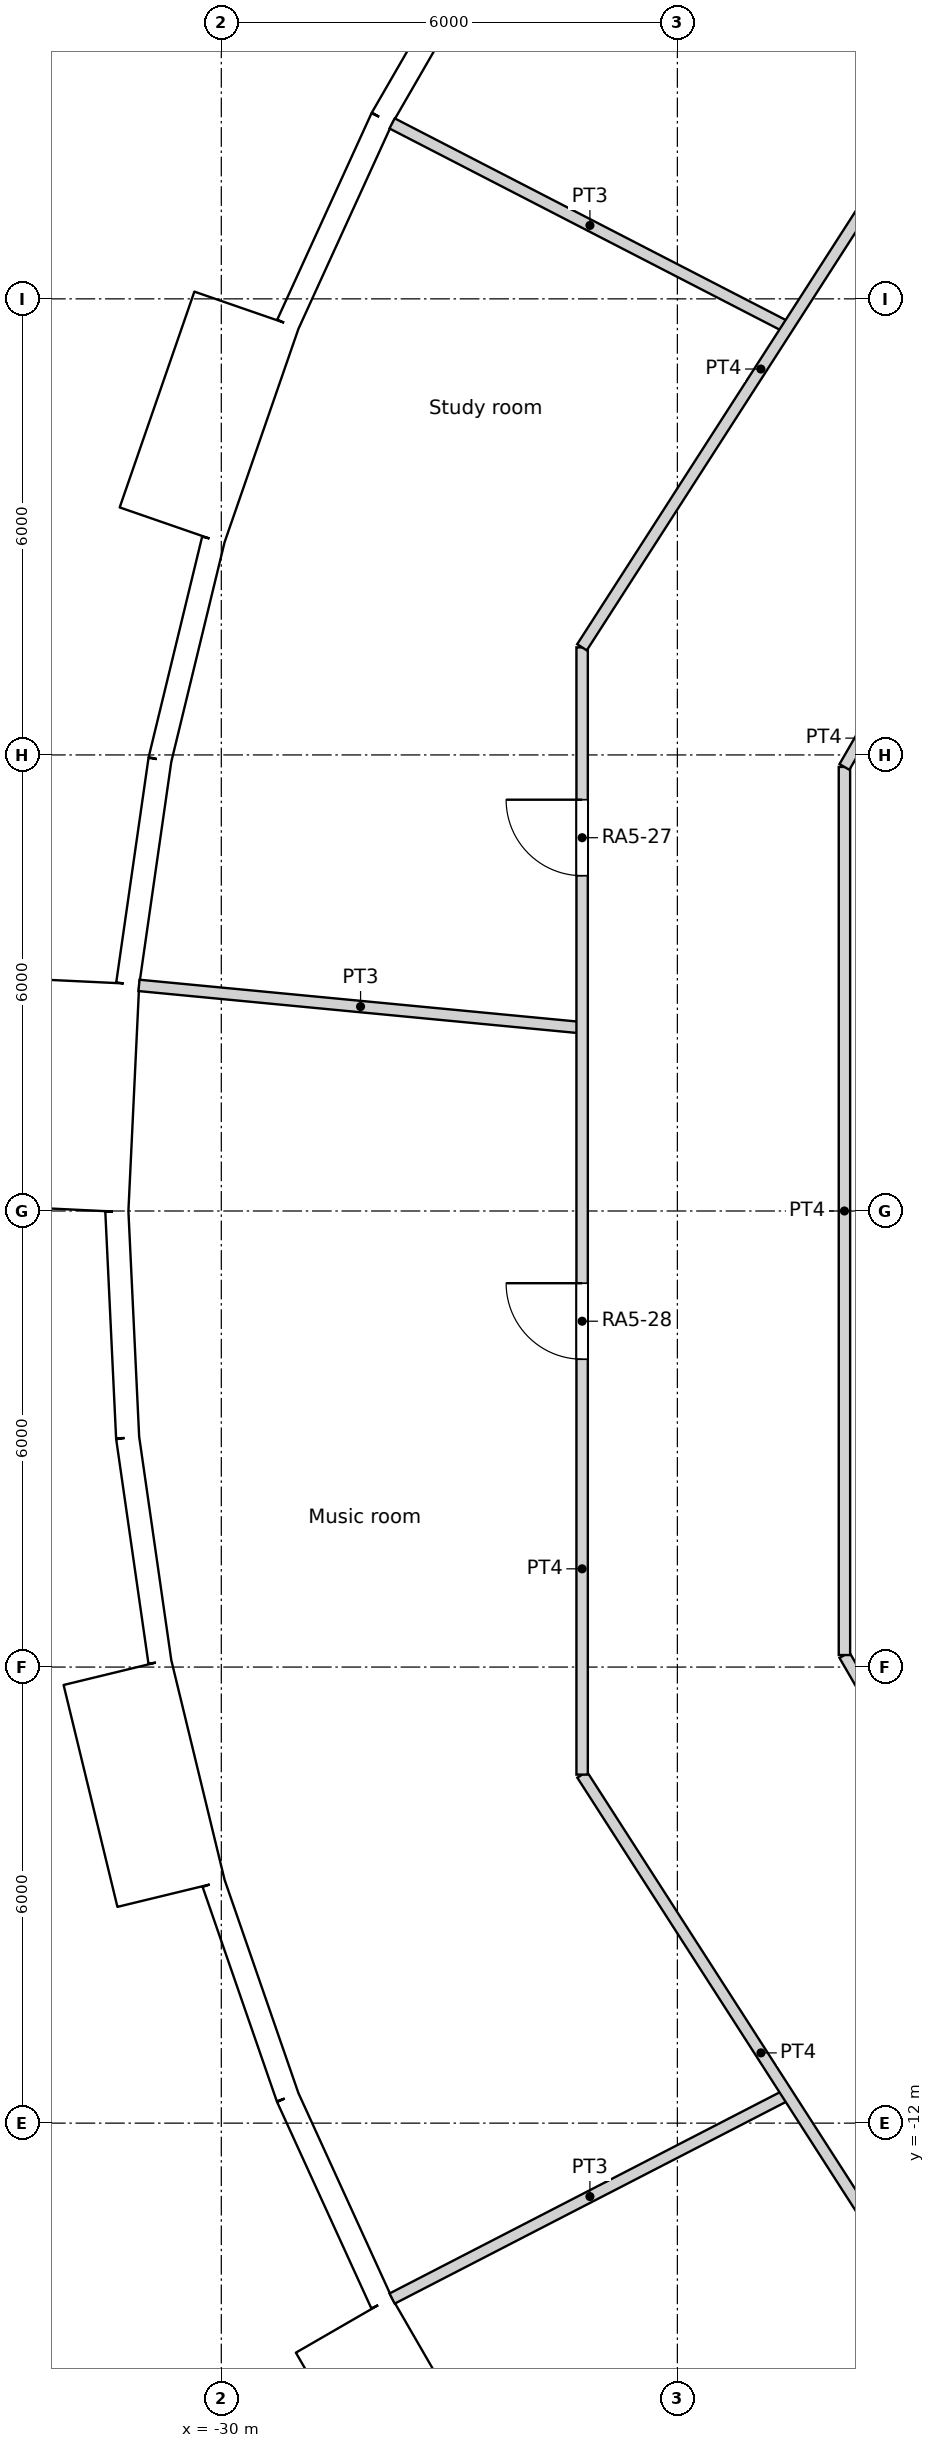
"""IFC4 building model, lengths in metres.
Left out: names, types, materials, properties, quantities, classifications, styles, units other than length and angle.
Written with IfcOpenShell. Run it as: python <this file> out.ifc"""

import sys

from ifc_helpers import new_model, si_unit, direction, frame, frame_2d, origin, origin_2d, place, context, subcontext, project, spatial, rectangle, circle, extrude, element, fill, save


model = new_model("IFC4")
c1 = context("Model", 3, precision=1e-05, world=origin(), true_north=direction((0.0, 1.0)))
c2 = subcontext(c1, "Body", "Model", "MODEL_VIEW")
j1 = project(units=[si_unit("LENGTHUNIT", "METRE"), si_unit("PLANEANGLEUNIT", "RADIAN")], contexts=[c1])
p1 = place(None, origin())
s1 = spatial("IfcSite", under=j1, at=p1, CompositionType="ELEMENT")
p2 = place(p1, origin())
s2 = spatial("IfcBuilding", under=s1, at=p2, CompositionType="ELEMENT")
p3 = place(p2, frame((0.0, 0.0, 71.4)))
s3 = spatial("IfcBuildingStorey", under=s2, at=p3, CompositionType="ELEMENT", Elevation=71.4)
for number, where, z_axis, x_axis in (
    (1, (-26.909, 13.873, 0.0), (0.0, 0.0, 1.0), (1.0, 0.0, 0.0)),
    (2, (-29.048, 8.529, 0.0), (0.0, 0.0, 1.0), (1.0, 0.0, 0.0)),
    (3, (-30.137, 2.878, 0.0), (0.0, 0.0, 1.0), (1.0, 0.0, 0.0)),
    (4, (-30.137, -2.878, 0.0), (0.0, 0.0, 1.0), (1.0, 0.0, 0.0)),
    (5, (-29.048, -8.529, 0.0), (0.0, 0.0, 1.0), (1.0, 0.0, 0.0)),
    (6, (-26.909, -13.873, 0.0), (0.0, 0.0, 1.0), (1.0, 0.0, 0.0)),
):
    element("IfcColumn", number, at=place(p3, frame(where, z_axis=z_axis, x_axis=x_axis)), inside=s3, PredefinedType="COLUMN", context=c2, shape_type="SweptSolid", body=[
        extrude(circle(Radius=0.6, at=origin_2d()), origin(), (0.0, 0.0, 1.0), 3.6),
    ])
for number, where, z_axis, x_axis in (
    (7, (-23.067, 8.396, 0.0), (0.0, 0.0, 1.0), (1.0, 0.0, 0.0)),
    (8, (-24.382, 2.85, 0.0), (0.0, 0.0, 1.0), (1.0, 0.0, 0.0)),
    (9, (-24.382, -2.85, 0.0), (0.0, 0.0, 1.0), (1.0, 0.0, 0.0)),
    (10, (-23.067, -8.396, 0.0), (0.0, 0.0, 1.0), (1.0, 0.0, 0.0)),
):
    element("IfcColumn", number, at=place(p3, frame(where, z_axis=z_axis, x_axis=x_axis)), inside=s3, PredefinedType="COLUMN", context=c2, shape_type="SweptSolid", body=[
        extrude(circle(Radius=0.65, at=origin_2d()), origin(), (0.0, 0.0, 1.0), 3.6),
    ])
p4 = place(p3, frame((-26.397, 16.957, 0.0), z_axis=(0.0, 0.0, 1.0), x_axis=(-0.499999078476, -0.866025935826, 0.0)))
e11 = element("IfcWall", 11, at=p4, inside=s3, PredefinedType="SOLIDWALL", context=c2, shape_type="SweptSolid", body=[
    extrude(rectangle(XDim=2.979, YDim=0.3, at=frame_2d((1.49, 0.0))), origin(), (0.0, 0.0, 1.0), 3.15),
])
p5 = place(p4, frame((1.49, 0.0, 1.55)))
e12 = element("IfcOpeningElement", 12, at=p5, cuts=e11, PredefinedType="OPENING", context=c2, shape_type="SweptSolid", body=[
    extrude(circle(Radius=0.9, at=origin_2d()), frame((0.0, 0.16, 0.0), z_axis=(0.0, -1.0, 0.0), x_axis=(1.0, 0.0, 0.0)), (0.0, 0.0, 1.0), 0.32),
])
p6 = place(p3, frame((-27.887, 14.377, 0.0), z_axis=(0.0, 0.0, 1.0), x_axis=(-0.415407317162, -0.909635509888, 0.0)))
e13 = element("IfcWall", 13, at=p6, inside=s3, PredefinedType="SOLIDWALL", context=c2, shape_type="SweptSolid", body=[
    extrude(rectangle(XDim=2.98, YDim=0.3, at=frame_2d((1.49, 0.0))), origin(), (0.0, 0.0, 1.0), 3.15),
])
p7 = place(p6, frame((1.49, 0.0, 1.55)))
e14 = element("IfcOpeningElement", 14, at=p7, cuts=e13, PredefinedType="OPENING", context=c2, shape_type="SweptSolid", body=[
    extrude(circle(Radius=0.9, at=origin_2d()), frame((0.0, 0.16, 0.0), z_axis=(0.0, -1.0, 0.0), x_axis=(1.0, 0.0, 0.0)), (0.0, 0.0, 1.0), 0.32),
])
p8 = place(p3, frame((-29.668, 11.855, -0.45), z_axis=(0.0, 0.0, 1.0), x_axis=(-0.327071431777, -0.944999618262, 0.0)))
e15 = element("IfcWall", 15, at=p8, inside=s3, PredefinedType="ELEMENTEDWALL", context=c2, shape_type="SweptSolid", body=[
    extrude(rectangle(XDim=3.0, YDim=1.45, at=frame_2d((1.5, 0.0))), origin(), (0.0, 0.0, 1.0), 3.6),
])
p9 = place(p8, frame((1.5, 0.0, 2.0)))
e16 = element("IfcOpeningElement", 16, at=p9, cuts=e15, PredefinedType="OPENING", context=c2, shape_type="SweptSolid", body=[
    extrude(circle(Radius=0.9, at=origin_2d()), frame((0.0, 0.735, 0.0), z_axis=(0.0, -1.0, 0.0), x_axis=(1.0, 0.0, 0.0)), (0.0, 0.0, 1.0), 1.47),
])
p10 = place(p3, frame((-30.105, 8.833, 0.0), z_axis=(0.0, 0.0, 1.0), x_axis=(-0.235743081534, -0.971815414319, 0.0)))
e17 = element("IfcWall", 17, at=p10, inside=s3, PredefinedType="SOLIDWALL", context=c2, shape_type="SweptSolid", body=[
    extrude(rectangle(XDim=2.979, YDim=0.3, at=frame_2d((1.49, 0.0))), origin(), (0.0, 0.0, 1.0), 3.15),
])
p11 = place(p10, frame((1.49, 0.0, 1.55)))
e18 = element("IfcOpeningElement", 18, at=p11, cuts=e17, PredefinedType="OPENING", context=c2, shape_type="SweptSolid", body=[
    extrude(circle(Radius=0.9, at=origin_2d()), frame((0.0, 0.16, 0.0), z_axis=(0.0, -1.0, 0.0), x_axis=(1.0, 0.0, 0.0)), (0.0, 0.0, 1.0), 0.32),
])
p12 = place(p3, frame((-30.807, 5.938, 0.0), z_axis=(0.0, 0.0, 1.0), x_axis=(-0.142315996627, -0.989821275334, 0.0)))
e19 = element("IfcWall", 19, at=p12, inside=s3, PredefinedType="SOLIDWALL", context=c2, shape_type="SweptSolid", body=[
    extrude(rectangle(XDim=2.98, YDim=0.3, at=frame_2d((1.49, 0.0))), origin(), (0.0, 0.0, 1.0), 3.15),
])
p13 = place(p12, frame((1.49, 0.0, 1.55)))
e20 = element("IfcOpeningElement", 20, at=p13, cuts=e19, PredefinedType="OPENING", context=c2, shape_type="SweptSolid", body=[
    extrude(circle(Radius=0.9, at=origin_2d()), frame((0.0, 0.16, 0.0), z_axis=(0.0, -1.0, 0.0), x_axis=(1.0, 0.0, 0.0)), (0.0, 0.0, 1.0), 0.32),
])
p14 = place(p3, frame((-31.806, 3.017, -0.45), z_axis=(0.0, 0.0, 1.0), x_axis=(-0.047607680889, -0.998866111509, 0.0)))
e21 = element("IfcWall", 21, at=p14, inside=s3, PredefinedType="ELEMENTEDWALL", context=c2, shape_type="SweptSolid", body=[
    extrude(rectangle(XDim=3.0, YDim=1.45, at=frame_2d((1.5, 0.0))), origin(), (0.0, 0.0, 1.0), 3.6),
])
p15 = place(p14, frame((1.5, 0.0, 2.0)))
e22 = element("IfcOpeningElement", 22, at=p15, cuts=e21, PredefinedType="OPENING", context=c2, shape_type="SweptSolid", body=[
    extrude(circle(Radius=0.9, at=origin_2d()), frame((0.0, 0.735, 0.0), z_axis=(0.0, -1.0, 0.0), x_axis=(1.0, 0.0, 0.0)), (0.0, 0.0, 1.0), 1.47),
])
p16 = place(p3, frame((-31.374, -0.006, 0.0), z_axis=(0.0, 0.0, 1.0), x_axis=(0.047522328113, -0.998870175914, 0.0)))
e23 = element("IfcWall", 23, at=p16, inside=s3, PredefinedType="SOLIDWALL", context=c2, shape_type="SweptSolid", body=[
    extrude(rectangle(XDim=2.98, YDim=0.3, at=frame_2d((1.49, 0.0))), origin(), (0.0, 0.0, 1.0), 3.15),
])
p17 = place(p16, frame((1.49, 0.0, 1.55)))
e24 = element("IfcOpeningElement", 24, at=p17, cuts=e23, PredefinedType="OPENING", context=c2, shape_type="SweptSolid", body=[
    extrude(circle(Radius=0.9, at=origin_2d()), frame((0.0, 0.16, 0.0), z_axis=(0.0, -1.0, 0.0), x_axis=(1.0, 0.0, 0.0)), (0.0, 0.0, 1.0), 0.32),
])
p18 = place(p3, frame((-31.232, -2.982, 0.0), z_axis=(0.0, 0.0, 1.0), x_axis=(0.142327539111, -0.989819615693, 0.0)))
e25 = element("IfcWall", 25, at=p18, inside=s3, PredefinedType="SOLIDWALL", context=c2, shape_type="SweptSolid", body=[
    extrude(rectangle(XDim=2.979, YDim=0.3, at=frame_2d((1.49, 0.0))), origin(), (0.0, 0.0, 1.0), 3.15),
])
p19 = place(p18, frame((1.49, 0.0, 1.55)))
e26 = element("IfcOpeningElement", 26, at=p19, cuts=e25, PredefinedType="OPENING", context=c2, shape_type="SweptSolid", body=[
    extrude(circle(Radius=0.9, at=origin_2d()), frame((0.0, 0.16, 0.0), z_axis=(0.0, -1.0, 0.0), x_axis=(1.0, 0.0, 0.0)), (0.0, 0.0, 1.0), 0.32),
])
p20 = place(p3, frame((-31.368, -6.066, -0.45), z_axis=(0.0, 0.0, 1.0), x_axis=(0.235751415068, -0.971813392732, 0.0)))
e27 = element("IfcWall", 27, at=p20, inside=s3, PredefinedType="ELEMENTEDWALL", context=c2, shape_type="SweptSolid", body=[
    extrude(rectangle(XDim=3.0, YDim=1.45, at=frame_2d((1.5, 0.0))), origin(), (0.0, 0.0, 1.0), 3.6),
])
p21 = place(p20, frame((1.5, 0.0, 2.0)))
e28 = element("IfcOpeningElement", 28, at=p21, cuts=e27, PredefinedType="OPENING", context=c2, shape_type="SweptSolid", body=[
    extrude(circle(Radius=0.9, at=origin_2d()), frame((0.0, 0.735, 0.0), z_axis=(0.0, -1.0, 0.0), x_axis=(1.0, 0.0, 0.0)), (0.0, 0.0, 1.0), 1.47),
])
p22 = place(p3, frame((-30.102, -8.845, 0.0), z_axis=(0.0, 0.0, 1.0), x_axis=(0.327096492592, -0.944990944154, 0.0)))
e29 = element("IfcWall", 29, at=p22, inside=s3, PredefinedType="SOLIDWALL", context=c2, shape_type="SweptSolid", body=[
    extrude(rectangle(XDim=2.979, YDim=0.3, at=frame_2d((1.49, 0.0))), origin(), (0.0, 0.0, 1.0), 3.15),
])
p23 = place(p22, frame((1.49, 0.0, 1.55)))
e30 = element("IfcOpeningElement", 30, at=p23, cuts=e29, PredefinedType="OPENING", context=c2, shape_type="SweptSolid", body=[
    extrude(circle(Radius=0.9, at=origin_2d()), frame((0.0, 0.16, 0.0), z_axis=(0.0, -1.0, 0.0), x_axis=(1.0, 0.0, 0.0)), (0.0, 0.0, 1.0), 0.32),
])
p24 = place(p3, frame((-29.127, -11.661, 0.0), z_axis=(0.0, 0.0, 1.0), x_axis=(0.415407317162, -0.909635509888, 0.0)))
e31 = element("IfcWall", 31, at=p24, inside=s3, PredefinedType="SOLIDWALL", context=c2, shape_type="SweptSolid", body=[
    extrude(rectangle(XDim=2.98, YDim=0.3, at=frame_2d((1.49, 0.0))), origin(), (0.0, 0.0, 1.0), 3.15),
])
p25 = place(p24, frame((1.49, 0.0, 1.55)))
e32 = element("IfcOpeningElement", 32, at=p25, cuts=e31, PredefinedType="OPENING", context=c2, shape_type="SweptSolid", body=[
    extrude(circle(Radius=0.9, at=origin_2d()), frame((0.0, 0.16, 0.0), z_axis=(0.0, -1.0, 0.0), x_axis=(1.0, 0.0, 0.0)), (0.0, 0.0, 1.0), 0.32),
])
p26 = place(p3, frame((-28.388, -14.658, -0.45), z_axis=(0.0, 0.0, 1.0), x_axis=(0.499990139034, -0.866031096941, 0.0)))
e33 = element("IfcWall", 33, at=p26, inside=s3, PredefinedType="ELEMENTEDWALL", context=c2, shape_type="SweptSolid", body=[
    extrude(rectangle(XDim=3.0, YDim=1.45, at=frame_2d((1.5, 0.0))), origin(), (0.0, 0.0, 1.0), 3.6),
])
p27 = place(p26, frame((1.5, 0.0, 2.0)))
e34 = element("IfcOpeningElement", 34, at=p27, cuts=e33, PredefinedType="OPENING", context=c2, shape_type="SweptSolid", body=[
    extrude(circle(Radius=0.9, at=origin_2d()), frame((0.0, 0.735, 0.0), z_axis=(0.0, -1.0, 0.0), x_axis=(1.0, 0.0, 0.0)), (0.0, 0.0, 1.0), 1.47),
])
p28 = place(p3, frame((-25.255, 7.416, 0.0), z_axis=(0.0, 0.0, 1.0), x_axis=(0.540805851332, 0.841147449123, 0.0)))
e35 = element("IfcWall", 35, at=p28, inside=s3, PredefinedType="PARTITIONING", context=c2, shape_type="SweptSolid", body=[
    extrude(rectangle(XDim=14.829, YDim=0.15, at=frame_2d((7.415, 0.0))), origin(), (0.0, 0.0, 1.0), 3.15),
])
p29 = place(p28, frame((8.754, 0.0, 0.0)))
e36 = element("IfcOpeningElement", 36, at=p29, cuts=e35, PredefinedType="OPENING", context=c2, shape_type="SweptSolid", body=[
    extrude(rectangle(XDim=1.0, YDim=2.04, at=frame_2d((0.5, 1.02))), frame((0.0, 0.075, 0.0), z_axis=(0.0, -1.0, 0.0), x_axis=(1.0, 0.0, 0.0)), (0.0, 0.0, 1.0), 0.15),
])
p30 = place(p3, frame((-21.802, 5.842, 0.0), z_axis=(0.0, 0.0, 1.0), x_axis=(0.500277597875, 0.865865073245, 0.0)))
e37 = element("IfcWall", 37, at=p30, inside=s3, PredefinedType="PARTITIONING", context=c2, shape_type="SweptSolid", body=[
    extrude(rectangle(XDim=0.875, YDim=0.15, at=frame_2d((0.438, 0.0))), origin(), (0.0, 0.0, 1.0), 3.15),
])
p31 = place(p3, frame((-21.802, -5.842, 0.0), z_axis=(0.0, 0.0, 1.0), x_axis=(0.0, 1.0, 0.0)))
e38 = element("IfcWall", 38, at=p31, inside=s3, PredefinedType="PARTITIONING", context=c2, shape_type="SweptSolid", body=[
    extrude(rectangle(XDim=11.684, YDim=0.15, at=frame_2d((5.842, 0.0))), origin(), (0.0, 0.0, 1.0), 3.15),
])
p32 = place(p3, frame((-21.802, -5.842, 0.0), z_axis=(0.0, 0.0, 1.0), x_axis=(0.500277597875, -0.865865073245, 0.0)))
e39 = element("IfcWall", 39, at=p32, inside=s3, PredefinedType="PARTITIONING", context=c2, shape_type="SweptSolid", body=[
    extrude(rectangle(XDim=0.875, YDim=0.15, at=frame_2d((0.438, 0.0))), origin(), (0.0, 0.0, 1.0), 3.15),
])
p33 = place(p3, frame((-25.253, -7.415, 0.0), z_axis=(0.0, 0.0, 1.0), x_axis=(0.0, 1.0, 0.0)))
e40 = element("IfcWall", 40, at=p33, inside=s3, PredefinedType="PARTITIONING", context=c2, shape_type="SweptSolid", body=[
    extrude(rectangle(XDim=14.83, YDim=0.15, at=frame_2d((7.415, 0.0))), origin(), (0.0, 0.0, 1.0), 3.15),
])
p34 = place(p33, frame((11.826, 0.0, 0.0)))
e41 = element("IfcOpeningElement", 41, at=p34, cuts=e40, PredefinedType="OPENING", context=c2, shape_type="SweptSolid", body=[
    extrude(rectangle(XDim=1.0, YDim=2.04, at=frame_2d((0.5, 1.02))), frame((0.0, 0.075, 0.0), z_axis=(0.0, -1.0, 0.0), x_axis=(1.0, 0.0, 0.0)), (0.0, 0.0, 1.0), 0.15),
])
p35 = place(p33, frame((5.465, 0.0, 0.0)))
e42 = element("IfcOpeningElement", 42, at=p35, cuts=e40, PredefinedType="OPENING", context=c2, shape_type="SweptSolid", body=[
    extrude(rectangle(XDim=1.0, YDim=2.04, at=frame_2d((0.5, 1.02))), frame((0.0, 0.075, 0.0), z_axis=(0.0, -1.0, 0.0), x_axis=(1.0, 0.0, 0.0)), (0.0, 0.0, 1.0), 0.15),
])
p36 = place(p3, frame((-25.253, -7.415, 0.0), z_axis=(0.0, 0.0, 1.0), x_axis=(0.540656073354, -0.841243728265, 0.0)))
e43 = element("IfcWall", 43, at=p36, inside=s3, PredefinedType="PARTITIONING", context=c2, shape_type="SweptSolid", body=[
    extrude(rectangle(XDim=14.829, YDim=0.15, at=frame_2d((7.415, 0.0))), origin(), (0.0, 0.0, 1.0), 3.15),
])
p37 = place(p36, frame((8.753, 0.0, 0.0)))
e44 = element("IfcOpeningElement", 44, at=p37, cuts=e43, PredefinedType="OPENING", context=c2, shape_type="SweptSolid", body=[
    extrude(rectangle(XDim=1.0, YDim=2.04, at=frame_2d((0.5, 1.02))), frame((0.0, 0.075, 0.0), z_axis=(0.0, -1.0, 0.0), x_axis=(1.0, 0.0, 0.0)), (0.0, 0.0, 1.0), 0.15),
])
p38 = place(p3, frame((-27.753, 14.308, 0.0), z_axis=(0.0, 0.0, 1.0), x_axis=(0.88877955153, -0.45833493079, 0.0)))
e45 = element("IfcWall", 45, at=p38, inside=s3, PredefinedType="PARTITIONING", context=c2, shape_type="SweptSolid", body=[
    extrude(rectangle(XDim=5.856, YDim=0.15, at=frame_2d((2.928, 0.0))), origin(), (0.0, 0.0, 1.0), 3.15),
])
p39 = place(p3, frame((-31.083, 2.968, 0.0), z_axis=(0.0, 0.0, 1.0), x_axis=(0.995465070325, -0.095127775983, 0.0)))
e46 = element("IfcWall", 46, at=p39, inside=s3, PredefinedType="PARTITIONING", context=c2, shape_type="SweptSolid", body=[
    extrude(rectangle(XDim=5.857, YDim=0.15, at=frame_2d((2.928, 0.0))), origin(), (0.0, 0.0, 1.0), 3.15),
])
p40 = place(p3, frame((-27.753, -14.308, 0.0), z_axis=(0.0, 0.0, 1.0), x_axis=(0.88877955153, 0.45833493079, 0.0)))
e47 = element("IfcWall", 47, at=p40, inside=s3, PredefinedType="PARTITIONING", context=c2, shape_type="SweptSolid", body=[
    extrude(rectangle(XDim=5.856, YDim=0.15, at=frame_2d((2.928, 0.0))), origin(), (0.0, 0.0, 1.0), 3.15),
])
p41 = place(p5, origin())
e48 = element("IfcWindow", 48, at=p41, inside=s3, PartitioningType="SINGLE_PANEL", PredefinedType="WINDOW", context=c2, shape_type="SweptSolid", body=[
    extrude(circle(Radius=0.9, at=origin_2d()), frame((0.0, 0.12, 0.0), z_axis=(0.0, -1.0, 0.0), x_axis=(1.0, 0.0, 0.0)), (0.0, 0.0, 1.0), 0.1),
])
fill(e12, e48)
p42 = place(p7, origin())
e49 = element("IfcWindow", 49, at=p42, inside=s3, PartitioningType="SINGLE_PANEL", PredefinedType="WINDOW", context=c2, shape_type="SweptSolid", body=[
    extrude(circle(Radius=0.9, at=origin_2d()), frame((0.0, 0.12, 0.0), z_axis=(0.0, -1.0, 0.0), x_axis=(1.0, 0.0, 0.0)), (0.0, 0.0, 1.0), 0.1),
])
fill(e14, e49)
p43 = place(p9, origin())
e50 = element("IfcWindow", 50, at=p43, inside=s3, PartitioningType="SINGLE_PANEL", PredefinedType="WINDOW", context=c2, shape_type="SweptSolid", body=[
    extrude(circle(Radius=0.9, at=origin_2d()), frame((0.0, 0.695, 0.0), z_axis=(0.0, -1.0, 0.0), x_axis=(1.0, 0.0, 0.0)), (0.0, 0.0, 1.0), 0.1),
])
fill(e16, e50)
p44 = place(p11, origin())
e51 = element("IfcWindow", 51, at=p44, inside=s3, PartitioningType="SINGLE_PANEL", PredefinedType="WINDOW", context=c2, shape_type="SweptSolid", body=[
    extrude(circle(Radius=0.9, at=origin_2d()), frame((0.0, 0.12, 0.0), z_axis=(0.0, -1.0, 0.0), x_axis=(1.0, 0.0, 0.0)), (0.0, 0.0, 1.0), 0.1),
])
fill(e18, e51)
p45 = place(p13, origin())
e52 = element("IfcWindow", 52, at=p45, inside=s3, PartitioningType="SINGLE_PANEL", PredefinedType="WINDOW", context=c2, shape_type="SweptSolid", body=[
    extrude(circle(Radius=0.9, at=origin_2d()), frame((0.0, 0.12, 0.0), z_axis=(0.0, -1.0, 0.0), x_axis=(1.0, 0.0, 0.0)), (0.0, 0.0, 1.0), 0.1),
])
fill(e20, e52)
p46 = place(p15, origin())
e53 = element("IfcWindow", 53, at=p46, inside=s3, PartitioningType="SINGLE_PANEL", PredefinedType="WINDOW", context=c2, shape_type="SweptSolid", body=[
    extrude(circle(Radius=0.9, at=origin_2d()), frame((0.0, 0.695, 0.0), z_axis=(0.0, -1.0, 0.0), x_axis=(1.0, 0.0, 0.0)), (0.0, 0.0, 1.0), 0.1),
])
fill(e22, e53)
p47 = place(p17, origin())
e54 = element("IfcWindow", 54, at=p47, inside=s3, PartitioningType="SINGLE_PANEL", PredefinedType="WINDOW", context=c2, shape_type="SweptSolid", body=[
    extrude(circle(Radius=0.9, at=origin_2d()), frame((0.0, 0.12, 0.0), z_axis=(0.0, -1.0, 0.0), x_axis=(1.0, 0.0, 0.0)), (0.0, 0.0, 1.0), 0.1),
])
fill(e24, e54)
p48 = place(p19, origin())
e55 = element("IfcWindow", 55, at=p48, inside=s3, PartitioningType="SINGLE_PANEL", PredefinedType="WINDOW", context=c2, shape_type="SweptSolid", body=[
    extrude(circle(Radius=0.9, at=origin_2d()), frame((0.0, 0.12, 0.0), z_axis=(0.0, -1.0, 0.0), x_axis=(1.0, 0.0, 0.0)), (0.0, 0.0, 1.0), 0.1),
])
fill(e26, e55)
p49 = place(p21, origin())
e56 = element("IfcWindow", 56, at=p49, inside=s3, PartitioningType="SINGLE_PANEL", PredefinedType="WINDOW", context=c2, shape_type="SweptSolid", body=[
    extrude(circle(Radius=0.9, at=origin_2d()), frame((0.0, 0.695, 0.0), z_axis=(0.0, -1.0, 0.0), x_axis=(1.0, 0.0, 0.0)), (0.0, 0.0, 1.0), 0.1),
])
fill(e28, e56)
p50 = place(p23, origin())
e57 = element("IfcWindow", 57, at=p50, inside=s3, PartitioningType="SINGLE_PANEL", PredefinedType="WINDOW", context=c2, shape_type="SweptSolid", body=[
    extrude(circle(Radius=0.9, at=origin_2d()), frame((0.0, 0.12, 0.0), z_axis=(0.0, -1.0, 0.0), x_axis=(1.0, 0.0, 0.0)), (0.0, 0.0, 1.0), 0.1),
])
fill(e30, e57)
p51 = place(p25, origin())
e58 = element("IfcWindow", 58, at=p51, inside=s3, PartitioningType="SINGLE_PANEL", PredefinedType="WINDOW", context=c2, shape_type="SweptSolid", body=[
    extrude(circle(Radius=0.9, at=origin_2d()), frame((0.0, 0.12, 0.0), z_axis=(0.0, -1.0, 0.0), x_axis=(1.0, 0.0, 0.0)), (0.0, 0.0, 1.0), 0.1),
])
fill(e32, e58)
p52 = place(p27, origin())
e59 = element("IfcWindow", 59, at=p52, inside=s3, PartitioningType="SINGLE_PANEL", PredefinedType="WINDOW", context=c2, shape_type="SweptSolid", body=[
    extrude(circle(Radius=0.9, at=origin_2d()), frame((0.0, 0.695, 0.0), z_axis=(0.0, -1.0, 0.0), x_axis=(1.0, 0.0, 0.0)), (0.0, 0.0, 1.0), 0.1),
])
fill(e34, e59)
p53 = place(p34, origin())
e60 = element("IfcDoor", 60, at=p53, inside=s3, OperationType="SINGLE_SWING_RIGHT", PredefinedType="DOOR", context=c2, shape_type="SweptSolid", body=[
    extrude(rectangle(XDim=1.0, YDim=2.04, at=frame_2d((0.5, 1.02))), frame((0.0, 0.025, 0.0), z_axis=(0.0, -1.0, 0.0), x_axis=(1.0, 0.0, 0.0)), (0.0, 0.0, 1.0), 0.05),
])
fill(e41, e60)
p54 = place(p35, origin())
e61 = element("IfcDoor", 61, at=p54, inside=s3, OperationType="SINGLE_SWING_RIGHT", PredefinedType="DOOR", context=c2, shape_type="SweptSolid", body=[
    extrude(rectangle(XDim=1.0, YDim=2.04, at=frame_2d((0.5, 1.02))), frame((0.0, 0.025, 0.0), z_axis=(0.0, -1.0, 0.0), x_axis=(1.0, 0.0, 0.0)), (0.0, 0.0, 1.0), 0.05),
])
fill(e42, e61)
save(model, sys.argv[1])
